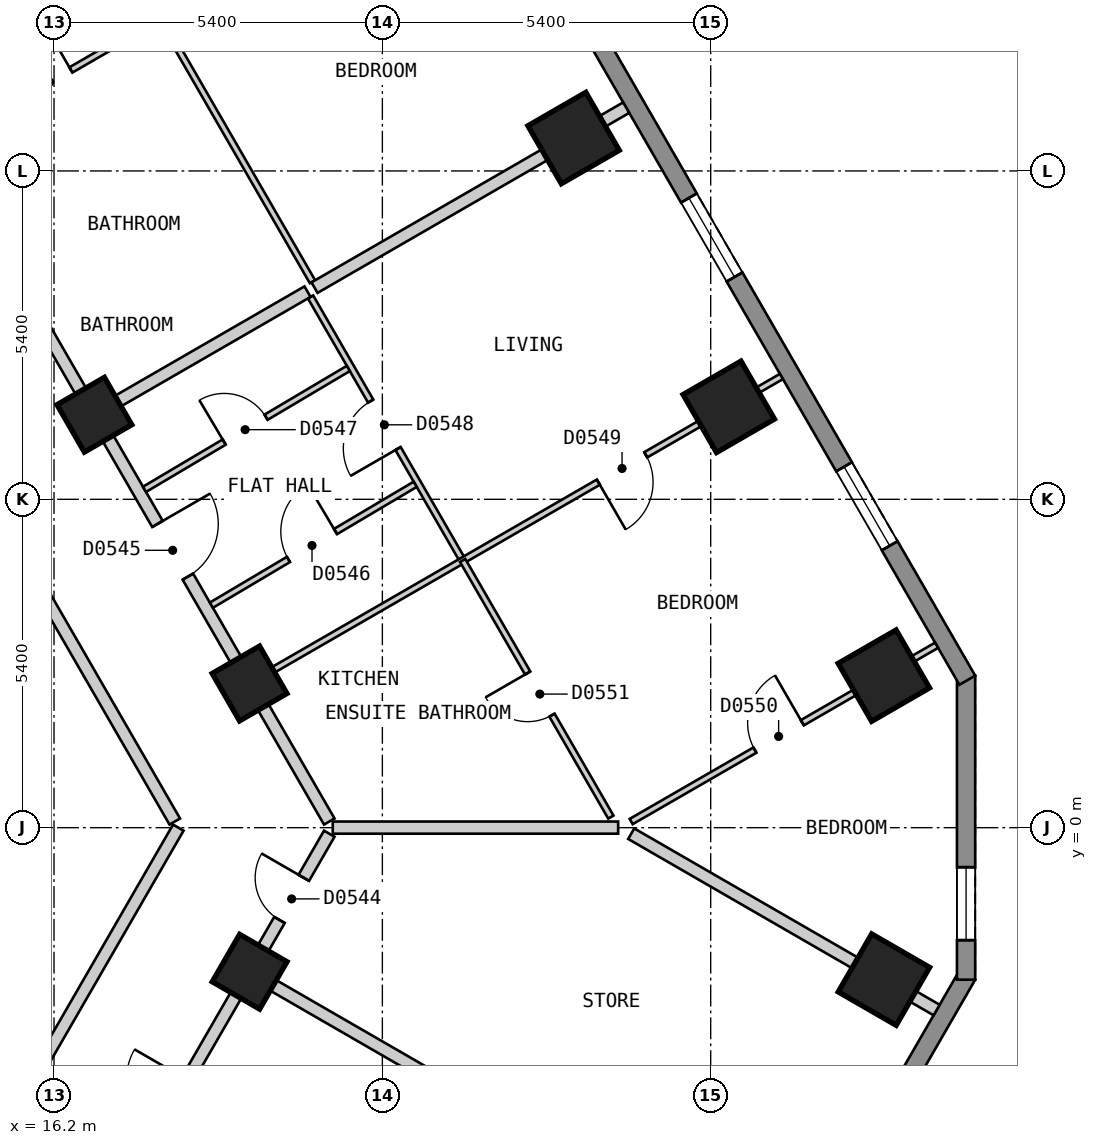
"""IFC4 building model, lengths in metres.
Left out: names, types, materials, properties, quantities, classifications, styles, units other than length and angle.
Written with IfcOpenShell. Run it as: python <this file> out.ifc"""

import sys

from ifc_helpers import new_model, si_unit, direction, frame, frame_2d, origin, origin_2d, place, context, subcontext, project, spatial, polyline, rectangle, outline, extrude, element, fill, save


model = new_model("IFC4")
c1 = context("Model", 3, precision=1e-05, world=origin(), true_north=direction((0.0, 1.0)))
c2 = subcontext(c1, "Body", "Model", "MODEL_VIEW")
j1 = project(units=[si_unit("LENGTHUNIT", "METRE"), si_unit("PLANEANGLEUNIT", "RADIAN")], contexts=[c1])
p1 = place(None, origin())
s1 = spatial("IfcSite", under=j1, at=p1, CompositionType="ELEMENT")
p2 = place(p1, origin())
s2 = spatial("IfcBuilding", under=s1, at=p2, CompositionType="ELEMENT")
p3 = place(p2, frame((0.0, 0.0, 50.4)))
s3 = spatial("IfcBuildingStorey", under=s2, at=p3, CompositionType="ELEMENT", Elevation=50.4)
for number, where, z_axis, x_axis in (
    (1, (29.849, -2.499, 0.0), (0.0, 0.0, 1.0), (0.5, 0.866, 0.0)),
    (2, (29.848, 2.5, 0.0), (0.0, 0.0, 1.0), (-0.5, 0.866, 0.0)),
    (3, (27.297, 6.921, 0.0), (0.0, 0.0, 1.0), (-0.5, 0.866, 0.0)),
    (4, (24.745, 11.341, 0.0), (0.0, 0.0, 1.0), (-0.5, 0.866, 0.0)),
):
    element("IfcColumn", number, at=place(p3, frame(where, z_axis=z_axis, x_axis=x_axis)), inside=s3, PredefinedType="COLUMN", context=c2, shape_type="SweptSolid", body=[
        extrude(rectangle(XDim=1.1, YDim=1.1, at=origin_2d()), origin(), (0.0, 0.0, 1.0), 3.0),
    ])
for number, where, z_axis, x_axis in (
    (5, (19.417, -2.369, 0.0), (0.0, 0.0, 1.0), (0.5, 0.866, 0.0)),
    (6, (19.416, 2.371, 0.0), (0.0, 0.0, 1.0), (-0.5, 0.866, 0.0)),
    (7, (16.864, 6.791, 0.0), (0.0, 0.0, 1.0), (-0.5, 0.866, 0.0)),
):
    element("IfcColumn", number, at=place(p3, frame(where, z_axis=z_axis, x_axis=x_axis)), inside=s3, PredefinedType="COLUMN", context=c2, shape_type="SweptSolid", body=[
        extrude(rectangle(XDim=0.9, YDim=0.9, at=origin_2d()), origin(), (0.0, 0.0, 1.0), 3.0),
    ])
p4 = place(p3, frame((17.71, -25.825, 0.0), z_axis=(0.0, 0.0, 1.0), x_axis=(0.500001938803, 0.866024284413, 0.0)))
e8 = element("IfcWall", 8, at=p4, inside=s3, PredefinedType="SOLIDWALL", context=c2, shape_type="SweptSolid", body=[
    extrude(outline(polyline([(0.0, -0.15), (27.02, -0.15), (26.94, 0.15), (0.08, 0.15), (0.0, -0.15)])), origin(), (0.0, 0.0, 1.0), 2.7),
])
p5 = place(p4, frame((2.553, 0.0, 0.15)))
e9 = element("IfcOpeningElement", 9, at=p5, cuts=e8, PredefinedType="OPENING", context=c2, shape_type="SweptSolid", body=[
    extrude(rectangle(XDim=1.5, YDim=2.1, at=frame_2d((0.75, 1.05))), frame((0.0, 0.16, 0.0), z_axis=(0.0, -1.0, 0.0), x_axis=(1.0, 0.0, 0.0)), (0.0, 0.0, 1.0), 0.32),
])
p6 = place(p4, frame((7.658, 0.0, 0.15)))
e10 = element("IfcOpeningElement", 10, at=p6, cuts=e8, PredefinedType="OPENING", context=c2, shape_type="SweptSolid", body=[
    extrude(rectangle(XDim=1.5, YDim=2.1, at=frame_2d((0.75, 1.05))), frame((0.0, 0.16, 0.0), z_axis=(0.0, -1.0, 0.0), x_axis=(1.0, 0.0, 0.0)), (0.0, 0.0, 1.0), 0.32),
])
p7 = place(p4, frame((12.761, 0.0, 0.15)))
e11 = element("IfcOpeningElement", 11, at=p7, cuts=e8, PredefinedType="OPENING", context=c2, shape_type="SweptSolid", body=[
    extrude(rectangle(XDim=1.5, YDim=2.1, at=frame_2d((0.75, 1.05))), frame((0.0, 0.16, 0.0), z_axis=(0.0, -1.0, 0.0), x_axis=(1.0, 0.0, 0.0)), (0.0, 0.0, 1.0), 0.32),
])
p8 = place(p4, frame((17.865, 0.0, 0.15)))
e12 = element("IfcOpeningElement", 12, at=p8, cuts=e8, PredefinedType="OPENING", context=c2, shape_type="SweptSolid", body=[
    extrude(rectangle(XDim=1.5, YDim=2.1, at=frame_2d((0.75, 1.05))), frame((0.0, 0.16, 0.0), z_axis=(0.0, -1.0, 0.0), x_axis=(1.0, 0.0, 0.0)), (0.0, 0.0, 1.0), 0.32),
])
p9 = place(p4, frame((22.969, 0.0, 0.15)))
e13 = element("IfcOpeningElement", 13, at=p9, cuts=e8, PredefinedType="OPENING", context=c2, shape_type="SweptSolid", body=[
    extrude(rectangle(XDim=1.5, YDim=2.1, at=frame_2d((0.75, 1.05))), frame((0.0, 0.16, 0.0), z_axis=(0.0, -1.0, 0.0), x_axis=(1.0, 0.0, 0.0)), (0.0, 0.0, 1.0), 0.32),
])
p10 = place(p3, frame((31.2, -2.5, 0.0), z_axis=(0.0, 0.0, 1.0), x_axis=(0.0, 1.0, 0.0)))
e14 = element("IfcWall", 14, at=p10, inside=s3, PredefinedType="SOLIDWALL", context=c2, shape_type="SweptSolid", body=[
    extrude(outline(polyline([(0.0, -0.15), (5.0, -0.15), (4.92, 0.15), (0.08, 0.15), (0.0, -0.15)])), origin(), (0.0, 0.0, 1.0), 2.7),
])
p11 = place(p10, frame((0.65, 0.0, 0.15)))
e15 = element("IfcOpeningElement", 15, at=p11, cuts=e14, PredefinedType="OPENING", context=c2, shape_type="SweptSolid", body=[
    extrude(rectangle(XDim=1.2, YDim=2.1, at=frame_2d((0.6, 1.05))), frame((0.0, 0.16, 0.0), z_axis=(0.0, -1.0, 0.0), x_axis=(1.0, 0.0, 0.0)), (0.0, 0.0, 1.0), 0.32),
])
p12 = place(p3, frame((31.22, 2.425, 0.0), z_axis=(0.0, 0.0, 1.0), x_axis=(-0.500001938803, 0.866024284413, 0.0)))
e16 = element("IfcWall", 16, at=p12, inside=s3, PredefinedType="SOLIDWALL", context=c2, shape_type="SweptSolid", body=[
    extrude(outline(polyline([(0.0, -0.15), (27.02, -0.15), (26.94, 0.15), (0.08, 0.15), (0.0, -0.15)])), origin(), (0.0, 0.0, 1.0), 2.7),
])
p13 = place(p12, frame((2.553, 0.0, 0.15)))
e17 = element("IfcOpeningElement", 17, at=p13, cuts=e16, PredefinedType="OPENING", context=c2, shape_type="SweptSolid", body=[
    extrude(rectangle(XDim=1.5, YDim=2.1, at=frame_2d((0.75, 1.05))), frame((0.0, 0.16, 0.0), z_axis=(0.0, -1.0, 0.0), x_axis=(1.0, 0.0, 0.0)), (0.0, 0.0, 1.0), 0.32),
])
p14 = place(p12, frame((7.657, 0.0, 0.15)))
e18 = element("IfcOpeningElement", 18, at=p14, cuts=e16, PredefinedType="OPENING", context=c2, shape_type="SweptSolid", body=[
    extrude(rectangle(XDim=1.5, YDim=2.1, at=frame_2d((0.75, 1.05))), frame((0.0, 0.16, 0.0), z_axis=(0.0, -1.0, 0.0), x_axis=(1.0, 0.0, 0.0)), (0.0, 0.0, 1.0), 0.32),
])
p15 = place(p12, frame((12.761, 0.0, 0.15)))
e19 = element("IfcOpeningElement", 19, at=p15, cuts=e16, PredefinedType="OPENING", context=c2, shape_type="SweptSolid", body=[
    extrude(rectangle(XDim=1.5, YDim=2.1, at=frame_2d((0.75, 1.05))), frame((0.0, 0.16, 0.0), z_axis=(0.0, -1.0, 0.0), x_axis=(1.0, 0.0, 0.0)), (0.0, 0.0, 1.0), 0.32),
])
p16 = place(p12, frame((17.865, 0.0, 0.15)))
e20 = element("IfcOpeningElement", 20, at=p16, cuts=e16, PredefinedType="OPENING", context=c2, shape_type="SweptSolid", body=[
    extrude(rectangle(XDim=1.5, YDim=2.1, at=frame_2d((0.75, 1.05))), frame((0.0, 0.16, 0.0), z_axis=(0.0, -1.0, 0.0), x_axis=(1.0, 0.0, 0.0)), (0.0, 0.0, 1.0), 0.32),
])
p17 = place(p12, frame((22.969, 0.0, 0.15)))
e21 = element("IfcOpeningElement", 21, at=p17, cuts=e16, PredefinedType="OPENING", context=c2, shape_type="SweptSolid", body=[
    extrude(rectangle(XDim=1.5, YDim=2.1, at=frame_2d((0.75, 1.05))), frame((0.0, 0.16, 0.0), z_axis=(0.0, -1.0, 0.0), x_axis=(1.0, 0.0, 0.0)), (0.0, 0.0, 1.0), 0.32),
])
p18 = place(p3, frame((9.18, 15.7, 0.0), z_axis=(0.0, 0.0, 1.0), x_axis=(0.500003652032, -0.866023295272, 0.0)))
e22 = element("IfcWall", 22, at=p18, inside=s3, PredefinedType="PARTITIONING", context=c2, shape_type="SweptSolid", body=[
    extrude(rectangle(XDim=18.012, YDim=0.2, at=frame_2d((9.006, 0.0))), origin(), (0.0, 0.0, 1.0), 2.7),
])
p19 = place(p18, frame((8.556, 0.0, 0.0)))
e23 = element("IfcOpeningElement", 23, at=p19, cuts=e22, PredefinedType="OPENING", context=c2, shape_type="SweptSolid", body=[
    extrude(rectangle(XDim=0.9, YDim=2.1, at=frame_2d((0.45, 1.05))), frame((0.0, 0.11, 0.0), z_axis=(0.0, -1.0, 0.0), x_axis=(1.0, 0.0, 0.0)), (0.0, 0.0, 1.0), 0.22),
])
p20 = place(p3, frame((10.45, 17.9, 0.0), z_axis=(0.0, 0.0, 1.0), x_axis=(0.500034352617, -0.866005569383, 0.0)))
e24 = element("IfcWall", 24, at=p20, inside=s3, PredefinedType="PARTITIONING", context=c2, shape_type="SweptSolid", body=[
    extrude(rectangle(XDim=20.553, YDim=0.2, at=frame_2d((10.276, 0.0))), origin(), (0.0, 0.0, 1.0), 2.7),
])
p21 = place(p20, frame((14.902, 0.0, 0.0)))
e25 = element("IfcOpeningElement", 25, at=p21, cuts=e24, PredefinedType="OPENING", context=c2, shape_type="SweptSolid", body=[
    extrude(rectangle(XDim=1.0, YDim=2.1, at=frame_2d((0.5, 1.05))), frame((0.0, 0.11, 0.0), z_axis=(0.0, -1.0, 0.0), x_axis=(1.0, 0.0, 0.0)), (0.0, 0.0, 1.0), 0.22),
])
p22 = place(p20, frame((4.671, 0.0, 0.0)))
e26 = element("IfcOpeningElement", 26, at=p22, cuts=e24, PredefinedType="OPENING", context=c2, shape_type="SweptSolid", body=[
    extrude(rectangle(XDim=1.0, YDim=2.1, at=frame_2d((0.5, 1.05))), frame((0.0, 0.11, 0.0), z_axis=(0.0, -1.0, 0.0), x_axis=(1.0, 0.0, 0.0)), (0.0, 0.0, 1.0), 0.22),
])
p23 = place(p3, frame((15.6, -4.579, 0.0), z_axis=(0.0, 0.0, 1.0), x_axis=(0.499927597274, 0.866067201483, 0.0)))
e27 = element("IfcWall", 27, at=p23, inside=s3, PredefinedType="PARTITIONING", context=c2, shape_type="SweptSolid", body=[
    extrude(rectangle(XDim=5.288, YDim=0.2, at=frame_2d((2.644, 0.0))), origin(), (0.0, 0.0, 1.0), 2.7),
])
p24 = place(p3, frame((15.707, -8.794, 0.0), z_axis=(0.0, 0.0, 1.0), x_axis=(0.50000451406, 0.866022797575, 0.0)))
e28 = element("IfcWall", 28, at=p24, inside=s3, PredefinedType="PARTITIONING", context=c2, shape_type="SweptSolid", body=[
    extrude(rectangle(XDim=10.04, YDim=0.2, at=frame_2d((5.02, 0.0))), origin(), (0.0, 0.0, 1.0), 2.7),
])
p25 = place(p24, frame((4.367, 0.0, 0.0)))
e29 = element("IfcOpeningElement", 29, at=p25, cuts=e28, PredefinedType="OPENING", context=c2, shape_type="SweptSolid", body=[
    extrude(rectangle(XDim=1.0, YDim=2.1, at=frame_2d((0.5, 1.05))), frame((0.0, 0.11, 0.0), z_axis=(0.0, -1.0, 0.0), x_axis=(1.0, 0.0, 0.0)), (0.0, 0.0, 1.0), 0.22),
])
p26 = place(p24, frame((8.402, 0.0, 0.0)))
e30 = element("IfcOpeningElement", 30, at=p26, cuts=e28, PredefinedType="OPENING", context=c2, shape_type="SweptSolid", body=[
    extrude(rectangle(XDim=0.8, YDim=2.1, at=frame_2d((0.4, 1.05))), frame((0.0, 0.11, 0.0), z_axis=(0.0, -1.0, 0.0), x_axis=(1.0, 0.0, 0.0)), (0.0, 0.0, 1.0), 0.22),
])
p27 = place(p3, frame((20.419, 8.728, 0.0), z_axis=(0.0, 0.0, 1.0), x_axis=(0.499958946799, -0.866049104564, 0.0)))
e31 = element("IfcWall", 31, at=p27, inside=s3, PredefinedType="PARTITIONING", context=c2, shape_type="SweptSolid", body=[
    extrude(rectangle(XDim=5.004, YDim=0.1, at=frame_2d((2.502, 0.0))), origin(), (0.0, 0.0, 1.0), 2.7),
])
p28 = place(p27, frame((1.978, 0.0, 0.0)))
e32 = element("IfcOpeningElement", 32, at=p28, cuts=e31, PredefinedType="OPENING", context=c2, shape_type="SweptSolid", body=[
    extrude(rectangle(XDim=0.9, YDim=2.1, at=frame_2d((0.45, 1.05))), frame((0.0, 0.06, 0.0), z_axis=(0.0, -1.0, 0.0), x_axis=(1.0, 0.0, 0.0)), (0.0, 0.0, 1.0), 0.12),
])
p29 = place(p3, frame((12.875, 22.1, 0.0), z_axis=(0.0, 0.0, 1.0), x_axis=(0.499994897061, -0.866028349948, 0.0)))
e33 = element("IfcWall", 33, at=p29, inside=s3, PredefinedType="PARTITIONING", context=c2, shape_type="SweptSolid", body=[
    extrude(rectangle(XDim=15.152, YDim=0.1, at=frame_2d((7.576, 0.0))), origin(), (0.0, 0.0, 1.0), 2.7),
])
p30 = place(p29, frame((7.146, 0.0, 0.0)))
e34 = element("IfcOpeningElement", 34, at=p30, cuts=e33, PredefinedType="OPENING", context=c2, shape_type="SweptSolid", body=[
    extrude(rectangle(XDim=0.9, YDim=2.1, at=frame_2d((0.45, 1.05))), frame((0.0, 0.06, 0.0), z_axis=(0.0, -1.0, 0.0), x_axis=(1.0, 0.0, 0.0)), (0.0, 0.0, 1.0), 0.12),
])
p31 = place(p3, frame((19.503, 2.421, 0.0), z_axis=(0.0, 0.0, 1.0), x_axis=(0.866065245018, 0.499930986609, 0.0)))
e35 = element("IfcWall", 35, at=p31, inside=s3, PredefinedType="PARTITIONING", context=c2, shape_type="SweptSolid", body=[
    extrude(rectangle(XDim=10.0, YDim=0.1, at=frame_2d((5.0, 0.0))), origin(), (0.0, 0.0, 1.0), 2.7),
])
p32 = place(p31, frame((6.523, 0.0, 0.0)))
e36 = element("IfcOpeningElement", 36, at=p32, cuts=e35, PredefinedType="OPENING", context=c2, shape_type="SweptSolid", body=[
    extrude(rectangle(XDim=0.9, YDim=2.1, at=frame_2d((0.45, 1.05))), frame((0.0, 0.06, 0.0), z_axis=(0.0, -1.0, 0.0), x_axis=(1.0, 0.0, 0.0)), (0.0, 0.0, 1.0), 0.12),
])
p33 = place(p3, frame((25.692, 0.101, 0.0), z_axis=(0.0, 0.0, 1.0), x_axis=(0.866116197112, 0.49984270836, 0.0)))
e37 = element("IfcWall", 37, at=p33, inside=s3, PredefinedType="PARTITIONING", context=c2, shape_type="SweptSolid", body=[
    extrude(rectangle(XDim=5.8, YDim=0.1, at=frame_2d((2.9, 0.0))), origin(), (0.0, 0.0, 1.0), 2.7),
])
p34 = place(p33, frame((2.35, 0.0, 0.0)))
e38 = element("IfcOpeningElement", 38, at=p34, cuts=e37, PredefinedType="OPENING", context=c2, shape_type="SweptSolid", body=[
    extrude(rectangle(XDim=0.9, YDim=2.1, at=frame_2d((0.45, 1.05))), frame((0.0, 0.06, 0.0), z_axis=(0.0, -1.0, 0.0), x_axis=(1.0, 0.0, 0.0)), (0.0, 0.0, 1.0), 0.12),
])
p35 = place(p3, frame((14.399, 11.261, 0.0), z_axis=(0.0, 0.0, 1.0), x_axis=(0.865980278416, 0.500078151287, 0.0)))
e39 = element("IfcWall", 39, at=p35, inside=s3, PredefinedType="PARTITIONING", context=c2, shape_type="SweptSolid", body=[
    extrude(rectangle(XDim=4.099, YDim=0.1, at=frame_2d((2.05, 0.0))), origin(), (0.0, 0.0, 1.0), 2.7),
])
p36 = place(p35, frame((1.6, 0.0, 0.0)))
e40 = element("IfcOpeningElement", 40, at=p36, cuts=e39, PredefinedType="OPENING", context=c2, shape_type="SweptSolid", body=[
    extrude(rectangle(XDim=0.8, YDim=2.1, at=frame_2d((0.4, 1.05))), frame((0.0, 0.06, 0.0), z_axis=(0.0, -1.0, 0.0), x_axis=(1.0, 0.0, 0.0)), (0.0, 0.0, 1.0), 0.12),
])
p37 = place(p3, frame((17.688, 5.564, 0.0), z_axis=(0.0, 0.0, 1.0), x_axis=(0.860107296662, 0.510113162179, 0.0)))
e41 = element("IfcWall", 41, at=p37, inside=s3, PredefinedType="PARTITIONING", context=c2, shape_type="SweptSolid", body=[
    extrude(rectangle(XDim=3.897, YDim=0.1, at=frame_2d((1.949, 0.0))), origin(), (0.0, 0.0, 1.0), 2.7),
])
p38 = place(p37, frame((1.524, 0.0, 0.0)))
e42 = element("IfcOpeningElement", 42, at=p38, cuts=e41, PredefinedType="OPENING", context=c2, shape_type="SweptSolid", body=[
    extrude(rectangle(XDim=0.8, YDim=2.1, at=frame_2d((0.4, 1.05))), frame((0.0, 0.06, 0.0), z_axis=(0.0, -1.0, 0.0), x_axis=(1.0, 0.0, 0.0)), (0.0, 0.0, 1.0), 0.12),
])
p39 = place(p3, frame((18.788, 3.659, 0.0), z_axis=(0.0, 0.0, 1.0), x_axis=(0.860090994311, 0.510140648749, 0.0)))
e43 = element("IfcWall", 43, at=p39, inside=s3, PredefinedType="PARTITIONING", context=c2, shape_type="SweptSolid", body=[
    extrude(rectangle(XDim=3.897, YDim=0.1, at=frame_2d((1.948, 0.0))), origin(), (0.0, 0.0, 1.0), 2.7),
])
p40 = place(p39, frame((1.474, 0.0, 0.0)))
e44 = element("IfcOpeningElement", 44, at=p40, cuts=e43, PredefinedType="OPENING", context=c2, shape_type="SweptSolid", body=[
    extrude(rectangle(XDim=0.9, YDim=2.1, at=frame_2d((0.45, 1.05))), frame((0.0, 0.06, 0.0), z_axis=(0.0, -1.0, 0.0), x_axis=(1.0, 0.0, 0.0)), (0.0, 0.0, 1.0), 0.12),
])
p41 = place(p3, frame((19.503, -2.419, 0.0), z_axis=(0.0, 0.0, 1.0), x_axis=(0.866022959057, -0.500004234368, 0.0)))
e45 = element("IfcWall", 45, at=p41, inside=s3, PredefinedType="PARTITIONING", context=c2, shape_type="SweptSolid", body=[
    extrude(rectangle(XDim=10.0, YDim=0.2, at=frame_2d((5.0, 0.0))), origin(), (0.0, 0.0, 1.0), 2.7),
])
p42 = place(p3, frame((25.693, -0.099, 0.0), z_axis=(0.0, 0.0, 1.0), x_axis=(0.866032775405, -0.499987231761, 0.0)))
e46 = element("IfcWall", 46, at=p42, inside=s3, PredefinedType="PARTITIONING", context=c2, shape_type="SweptSolid", body=[
    extrude(rectangle(XDim=5.8, YDim=0.2, at=frame_2d((2.9, 0.0))), origin(), (0.0, 0.0, 1.0), 2.7),
])
p43 = place(p3, frame((20.784, 0.001, 0.0), z_axis=(0.0, 0.0, 1.0), x_axis=(1.0, 0.0, 0.0)))
e47 = element("IfcWall", 47, at=p43, inside=s3, PredefinedType="PARTITIONING", context=c2, shape_type="SweptSolid", body=[
    extrude(rectangle(XDim=4.694, YDim=0.2, at=frame_2d((2.347, 0.0))), origin(), (0.0, 0.0, 1.0), 2.7),
])
p44 = place(p3, frame((16.95, 6.841, 0.0), z_axis=(0.0, 0.0, 1.0), x_axis=(0.866031112038, 0.499990112884, 0.0)))
e48 = element("IfcWall", 48, at=p44, inside=s3, PredefinedType="PARTITIONING", context=c2, shape_type="SweptSolid", body=[
    extrude(rectangle(XDim=3.948, YDim=0.2, at=frame_2d((1.974, 0.0))), origin(), (0.0, 0.0, 1.0), 2.7),
])
p45 = place(p3, frame((20.484, 8.881, 0.0), z_axis=(0.0, 0.0, 1.0), x_axis=(0.866000821391, 0.500042575537, 0.0)))
e49 = element("IfcWall", 49, at=p45, inside=s3, PredefinedType="PARTITIONING", context=c2, shape_type="SweptSolid", body=[
    extrude(rectangle(XDim=5.919, YDim=0.2, at=frame_2d((2.96, 0.0))), origin(), (0.0, 0.0, 1.0), 2.7),
])
p46 = place(p3, frame((22.921, 4.394, 0.0), z_axis=(0.0, 0.0, 1.0), x_axis=(0.500093956194, -0.865971151354, 0.0)))
e50 = element("IfcWall", 50, at=p46, inside=s3, PredefinedType="PARTITIONING", context=c2, shape_type="SweptSolid", body=[
    extrude(rectangle(XDim=4.873, YDim=0.1, at=frame_2d((2.437, 0.0))), origin(), (0.0, 0.0, 1.0), 2.7),
])
p47 = place(p46, frame((2.137, 0.0, 0.0)))
e51 = element("IfcOpeningElement", 51, at=p47, cuts=e50, PredefinedType="OPENING", context=c2, shape_type="SweptSolid", body=[
    extrude(rectangle(XDim=0.8, YDim=2.1, at=frame_2d((0.4, 1.05))), frame((0.0, 0.06, 0.0), z_axis=(0.0, -1.0, 0.0), x_axis=(1.0, 0.0, 0.0)), (0.0, 0.0, 1.0), 0.12),
])
p48 = place(p11, origin())
e52 = element("IfcWindow", 52, at=p48, inside=s3, PartitioningType="SINGLE_PANEL", PredefinedType="WINDOW", context=c2, shape_type="SweptSolid", body=[
    extrude(rectangle(XDim=1.2, YDim=2.1, at=frame_2d((0.6, 1.05))), frame((0.0, 0.03, 0.0), z_axis=(0.0, -1.0, 0.0), x_axis=(1.0, 0.0, 0.0)), (0.0, 0.0, 1.0), 0.06),
])
fill(e15, e52)
p49 = place(p13, origin())
e53 = element("IfcWindow", 53, at=p49, inside=s3, PartitioningType="SINGLE_PANEL", PredefinedType="WINDOW", context=c2, shape_type="SweptSolid", body=[
    extrude(rectangle(XDim=1.5, YDim=2.1, at=frame_2d((0.75, 1.05))), frame((0.0, 0.03, 0.0), z_axis=(0.0, -1.0, 0.0), x_axis=(1.0, 0.0, 0.0)), (0.0, 0.0, 1.0), 0.06),
])
fill(e17, e53)
p50 = place(p14, origin())
e54 = element("IfcWindow", 54, at=p50, inside=s3, PartitioningType="SINGLE_PANEL", PredefinedType="WINDOW", context=c2, shape_type="SweptSolid", body=[
    extrude(rectangle(XDim=1.5, YDim=2.1, at=frame_2d((0.75, 1.05))), frame((0.0, 0.03, 0.0), z_axis=(0.0, -1.0, 0.0), x_axis=(1.0, 0.0, 0.0)), (0.0, 0.0, 1.0), 0.06),
])
fill(e18, e54)
p51 = place(p26, origin())
e55 = element("IfcDoor", 55, at=p51, inside=s3, OperationType="SINGLE_SWING_RIGHT", PredefinedType="DOOR", context=c2, shape_type="SweptSolid", body=[
    extrude(rectangle(XDim=0.8, YDim=2.1, at=frame_2d((0.4, 1.05))), frame((0.0, 0.025, 0.0), z_axis=(0.0, -1.0, 0.0), x_axis=(1.0, 0.0, 0.0)), (0.0, 0.0, 1.0), 0.05),
])
fill(e30, e55)
p52 = place(p21, origin())
e56 = element("IfcDoor", 56, at=p52, inside=s3, OperationType="SINGLE_SWING_LEFT", PredefinedType="DOOR", context=c2, shape_type="SweptSolid", body=[
    extrude(rectangle(XDim=1.0, YDim=2.1, at=frame_2d((0.5, 1.05))), frame((0.0, 0.025, 0.0), z_axis=(0.0, -1.0, 0.0), x_axis=(1.0, 0.0, 0.0)), (0.0, 0.0, 1.0), 0.05),
])
fill(e25, e56)
p53 = place(p40, origin())
e57 = element("IfcDoor", 57, at=p53, inside=s3, OperationType="SINGLE_SWING_RIGHT", PredefinedType="DOOR", context=c2, shape_type="SweptSolid", body=[
    extrude(rectangle(XDim=0.9, YDim=2.1, at=frame_2d((0.45, 1.05))), frame((0.0, 0.025, 0.0), z_axis=(0.0, -1.0, 0.0), x_axis=(1.0, 0.0, 0.0)), (0.0, 0.0, 1.0), 0.05),
])
fill(e44, e57)
p54 = place(p38, origin())
e58 = element("IfcDoor", 58, at=p54, inside=s3, OperationType="SINGLE_SWING_LEFT", PredefinedType="DOOR", context=c2, shape_type="SweptSolid", body=[
    extrude(rectangle(XDim=0.8, YDim=2.1, at=frame_2d((0.4, 1.05))), frame((0.0, 0.025, 0.0), z_axis=(0.0, -1.0, 0.0), x_axis=(1.0, 0.0, 0.0)), (0.0, 0.0, 1.0), 0.05),
])
fill(e42, e58)
p55 = place(p28, origin())
e59 = element("IfcDoor", 59, at=p55, inside=s3, OperationType="SINGLE_SWING_RIGHT", PredefinedType="DOOR", context=c2, shape_type="SweptSolid", body=[
    extrude(rectangle(XDim=0.9, YDim=2.1, at=frame_2d((0.45, 1.05))), frame((0.0, 0.025, 0.0), z_axis=(0.0, -1.0, 0.0), x_axis=(1.0, 0.0, 0.0)), (0.0, 0.0, 1.0), 0.05),
])
fill(e32, e59)
p56 = place(p32, origin())
e60 = element("IfcDoor", 60, at=p56, inside=s3, OperationType="SINGLE_SWING_LEFT", PredefinedType="DOOR", context=c2, shape_type="SweptSolid", body=[
    extrude(rectangle(XDim=0.9, YDim=2.1, at=frame_2d((0.45, 1.05))), frame((0.0, 0.025, 0.0), z_axis=(0.0, -1.0, 0.0), x_axis=(1.0, 0.0, 0.0)), (0.0, 0.0, 1.0), 0.05),
])
fill(e36, e60)
p57 = place(p34, origin())
e61 = element("IfcDoor", 61, at=p57, inside=s3, OperationType="SINGLE_SWING_RIGHT", PredefinedType="DOOR", context=c2, shape_type="SweptSolid", body=[
    extrude(rectangle(XDim=0.9, YDim=2.1, at=frame_2d((0.45, 1.05))), frame((0.0, 0.025, 0.0), z_axis=(0.0, -1.0, 0.0), x_axis=(1.0, 0.0, 0.0)), (0.0, 0.0, 1.0), 0.05),
])
fill(e38, e61)
p58 = place(p47, origin())
e62 = element("IfcDoor", 62, at=p58, inside=s3, OperationType="SINGLE_SWING_LEFT", PredefinedType="DOOR", context=c2, shape_type="SweptSolid", body=[
    extrude(rectangle(XDim=0.8, YDim=2.1, at=frame_2d((0.4, 1.05))), frame((0.0, 0.025, 0.0), z_axis=(0.0, -1.0, 0.0), x_axis=(1.0, 0.0, 0.0)), (0.0, 0.0, 1.0), 0.05),
])
fill(e51, e62)
p59 = place(p36, origin())
e63 = element("IfcDoor", 63, at=p59, inside=s3, OperationType="SINGLE_SWING_RIGHT", PredefinedType="DOOR", context=c2, shape_type="SweptSolid", body=[
    extrude(rectangle(XDim=0.8, YDim=2.1, at=frame_2d((0.4, 1.05))), frame((0.0, 0.025, 0.0), z_axis=(0.0, -1.0, 0.0), x_axis=(1.0, 0.0, 0.0)), (0.0, 0.0, 1.0), 0.05),
])
fill(e40, e63)
save(model, sys.argv[1])
